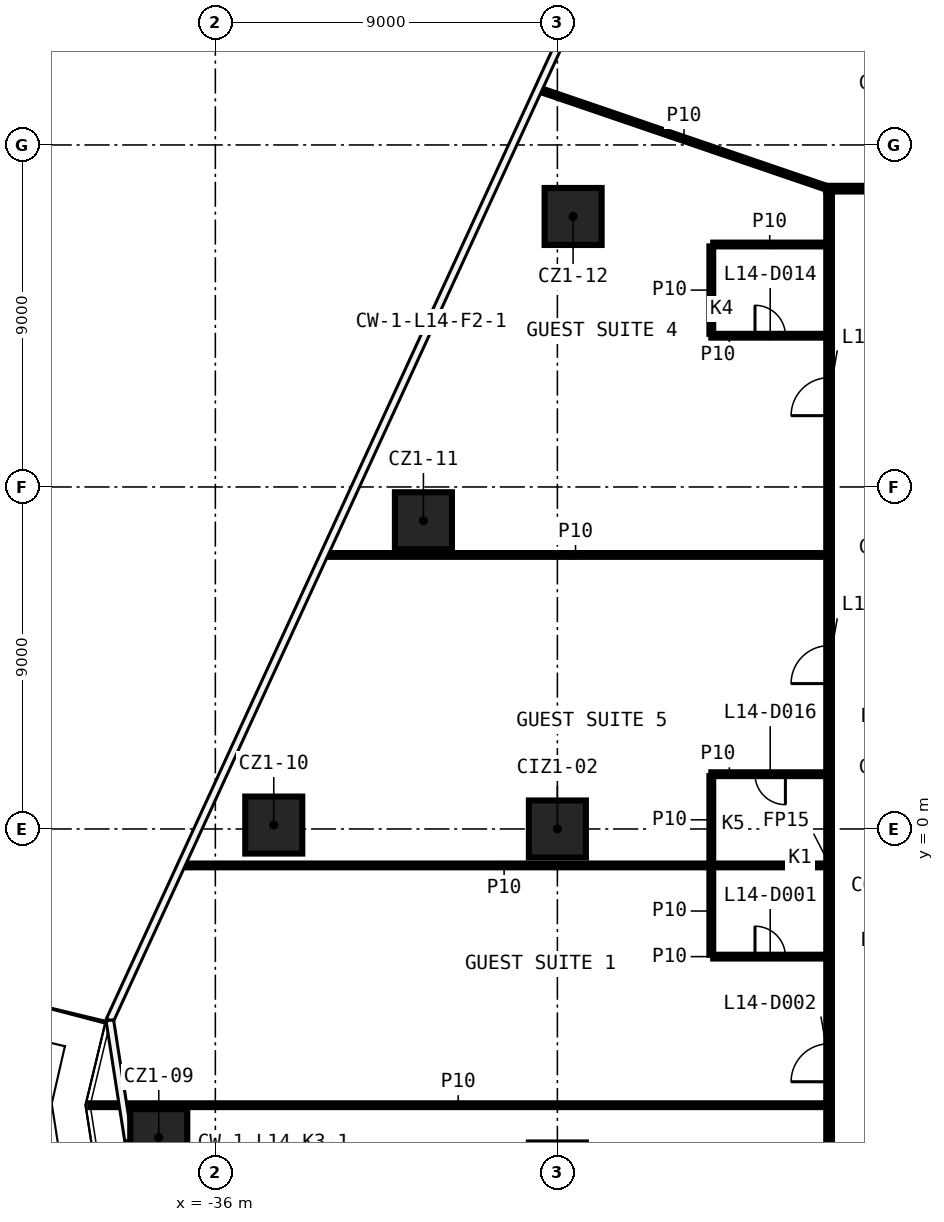
"""IFC4 building model, lengths in metres.
Left out: names, types, materials, properties, quantities, classifications, styles, units other than length and angle.
Written with IfcOpenShell. Run it as: python <this file> out.ifc"""

import sys

from ifc_helpers import new_model, si_unit, direction, frame, frame_2d, origin, origin_2d, place, context, subcontext, project, spatial, rectangle, extrude, element, fill, save


model = new_model("IFC4")
c1 = context("Model", 3, precision=1e-05, world=origin(), true_north=direction((0.0, 1.0)))
c2 = subcontext(c1, "Body", "Model", "MODEL_VIEW")
j1 = project(units=[si_unit("LENGTHUNIT", "METRE"), si_unit("PLANEANGLEUNIT", "RADIAN")], contexts=[c1])
p1 = place(None, origin())
s1 = spatial("IfcSite", under=j1, at=p1, CompositionType="ELEMENT")
p2 = place(p1, origin())
s2 = spatial("IfcBuilding", under=s1, at=p2, CompositionType="ELEMENT")
p3 = place(p2, frame((0.0, 0.0, 73.6)))
s3 = spatial("IfcBuildingStorey", under=s2, at=p3, CompositionType="ELEMENT", Elevation=73.6)
for number, where, z_axis, x_axis in (
    (1, (-37.489, -8.123, 0.0), (0.0, 0.0, 1.0), (1.0, 0.0, 0.0)),
    (2, (-34.463, 0.103, 0.0), (0.0, 0.0, 1.0), (1.0, 0.0, 0.0)),
    (3, (-30.525, 8.111, 0.0), (0.0, 0.0, 1.0), (1.0, 0.0, 0.0)),
    (4, (-26.586, 16.118, 0.0), (0.0, 0.0, 1.0), (1.0, 0.0, 0.0)),
    (5, (-27.0, 0.0, 0.0), (0.0, 0.0, 1.0), (1.0, 0.0, 0.0)),
):
    element("IfcColumn", number, at=place(p3, frame(where, z_axis=z_axis, x_axis=x_axis)), inside=s3, PredefinedType="COLUMN", context=c2, shape_type="SweptSolid", body=[
        extrude(rectangle(XDim=1.5, YDim=1.5, at=origin_2d()), origin(), (0.0, 0.0, 1.0), 3.3),
    ])
p4 = place(p3, frame((-39.293, -7.269, 0.0), z_axis=(0.0, 0.0, 1.0), x_axis=(1.0, 0.0, 0.0)))
e6 = element("IfcWall", 6, at=p4, inside=s3, PredefinedType="PARTITIONING", context=c2, shape_type="SweptSolid", body=[
    extrude(rectangle(XDim=19.368, YDim=0.1, at=frame_2d((9.684, 0.0))), origin(), (0.0, 0.0, 1.0), 3.3),
])
p5 = place(p3, frame((-22.9, -3.359, 0.0), z_axis=(0.0, 0.0, 1.0), x_axis=(1.0, 0.0, 0.0)))
e7 = element("IfcWall", 7, at=p5, inside=s3, PredefinedType="PARTITIONING", context=c2, shape_type="SweptSolid", body=[
    extrude(rectangle(XDim=2.975, YDim=0.1, at=frame_2d((1.487, 0.0))), origin(), (0.0, 0.0, 1.0), 3.3),
])
p6 = place(p5, frame((1.1, 0.0, 0.0)))
e8 = element("IfcOpeningElement", 8, at=p6, cuts=e7, PredefinedType="OPENING", context=c2, shape_type="SweptSolid", body=[
    extrude(rectangle(XDim=0.8, YDim=2.1, at=frame_2d((0.4, 1.05))), frame((0.0, 0.06, 0.0), z_axis=(0.0, -1.0, 0.0), x_axis=(1.0, 0.0, 0.0)), (0.0, 0.0, 1.0), 0.12),
])
p7 = place(p3, frame((-36.879, -0.959, 0.0), z_axis=(0.0, 0.0, 1.0), x_axis=(1.0, 0.0, 0.0)))
e9 = element("IfcWall", 9, at=p7, inside=s3, PredefinedType="PARTITIONING", context=c2, shape_type="SweptSolid", body=[
    extrude(rectangle(XDim=16.954, YDim=0.1, at=frame_2d((8.477, 0.0))), origin(), (0.0, 0.0, 1.0), 3.3),
])
p8 = place(p3, frame((-19.925, 1.441, 0.0), z_axis=(0.0, 0.0, 1.0), x_axis=(-1.0, 0.0, 0.0)))
e10 = element("IfcWall", 10, at=p8, inside=s3, PredefinedType="PARTITIONING", context=c2, shape_type="SweptSolid", body=[
    extrude(rectangle(XDim=3.025, YDim=0.1, at=frame_2d((1.512, 0.0))), origin(), (0.0, 0.0, 1.0), 3.3),
])
p9 = place(p8, frame((1.075, 0.0, 0.0)))
e11 = element("IfcOpeningElement", 11, at=p9, cuts=e10, PredefinedType="OPENING", context=c2, shape_type="SweptSolid", body=[
    extrude(rectangle(XDim=0.8, YDim=2.1, at=frame_2d((0.4, 1.05))), frame((0.0, 0.06, 0.0), z_axis=(0.0, -1.0, 0.0), x_axis=(1.0, 0.0, 0.0)), (0.0, 0.0, 1.0), 0.12),
])
p10 = place(p3, frame((-33.12, 7.211, 0.0), z_axis=(0.0, 0.0, 1.0), x_axis=(1.0, 0.0, 0.0)))
e12 = element("IfcWall", 12, at=p10, inside=s3, PredefinedType="PARTITIONING", context=c2, shape_type="SweptSolid", body=[
    extrude(rectangle(XDim=13.195, YDim=0.1, at=frame_2d((6.597, 0.0))), origin(), (0.0, 0.0, 1.0), 3.3),
])
p11 = place(p3, frame((-22.95, 12.98, 0.0), z_axis=(0.0, 0.0, 1.0), x_axis=(1.0, 0.0, 0.0)))
e13 = element("IfcWall", 13, at=p11, inside=s3, PredefinedType="PARTITIONING", context=c2, shape_type="SweptSolid", body=[
    extrude(rectangle(XDim=3.025, YDim=0.1, at=frame_2d((1.512, 0.0))), origin(), (0.0, 0.0, 1.0), 3.3),
])
p12 = place(p11, frame((1.15, 0.0, 0.0)))
e14 = element("IfcOpeningElement", 14, at=p12, cuts=e13, PredefinedType="OPENING", context=c2, shape_type="SweptSolid", body=[
    extrude(rectangle(XDim=0.8, YDim=2.1, at=frame_2d((0.4, 1.05))), frame((0.0, 0.06, 0.0), z_axis=(0.0, -1.0, 0.0), x_axis=(1.0, 0.0, 0.0)), (0.0, 0.0, 1.0), 0.12),
])
p13 = place(p3, frame((-22.9, 15.38, 0.0), z_axis=(0.0, 0.0, 1.0), x_axis=(1.0, 0.0, 0.0)))
e15 = element("IfcWall", 15, at=p13, inside=s3, PredefinedType="PARTITIONING", context=c2, shape_type="SweptSolid", body=[
    extrude(rectangle(XDim=2.975, YDim=0.1, at=frame_2d((1.487, 0.0))), origin(), (0.0, 0.0, 1.0), 3.3),
])
p14 = place(p3, frame((-19.925, 16.85, 0.0), z_axis=(0.0, 0.0, 1.0), x_axis=(1.0, 0.0, 0.0)))
e16 = element("IfcWall", 16, at=p14, inside=s3, PredefinedType="PARTITIONING", context=c2, shape_type="SweptSolid", body=[
    extrude(rectangle(XDim=39.85, YDim=0.15, at=frame_2d((19.925, 0.0))), origin(), (0.0, 0.0, 1.0), 3.3),
])
p15 = place(p14, frame((31.436, 0.0, 0.0)))
e17 = element("IfcOpeningElement", 17, at=p15, cuts=e16, PredefinedType="OPENING", context=c2, shape_type="SweptSolid", body=[
    extrude(rectangle(XDim=0.9, YDim=2.1, at=frame_2d((0.45, 1.05))), frame((0.0, 0.085, 0.0), z_axis=(0.0, -1.0, 0.0), x_axis=(1.0, 0.0, 0.0)), (0.0, 0.0, 1.0), 0.17),
])
p16 = place(p14, frame((16.954, 0.0, 0.0)))
e18 = element("IfcOpeningElement", 18, at=p16, cuts=e16, PredefinedType="OPENING", context=c2, shape_type="SweptSolid", body=[
    extrude(rectangle(XDim=0.9, YDim=2.1, at=frame_2d((0.45, 1.05))), frame((0.0, 0.085, 0.0), z_axis=(0.0, -1.0, 0.0), x_axis=(1.0, 0.0, 0.0)), (0.0, 0.0, 1.0), 0.17),
])
p17 = place(p14, frame((7.208, 0.0, 0.0)))
e19 = element("IfcOpeningElement", 19, at=p17, cuts=e16, PredefinedType="OPENING", context=c2, shape_type="SweptSolid", body=[
    extrude(rectangle(XDim=0.9, YDim=2.1, at=frame_2d((0.45, 1.05))), frame((0.0, 0.085, 0.0), z_axis=(0.0, -1.0, 0.0), x_axis=(1.0, 0.0, 0.0)), (0.0, 0.0, 1.0), 0.17),
])
p18 = place(p3, frame((-19.85, -16.775, 0.0), z_axis=(0.0, 0.0, 1.0), x_axis=(0.0, 1.0, 0.0)))
e20 = element("IfcWall", 20, at=p18, inside=s3, PredefinedType="PARTITIONING", context=c2, shape_type="SweptSolid", body=[
    extrude(rectangle(XDim=33.55, YDim=0.15, at=frame_2d((16.775, 0.0))), origin(), (0.0, 0.0, 1.0), 3.3),
])
p19 = place(p18, frame((10.123, 0.0, 0.0)))
e21 = element("IfcOpeningElement", 21, at=p19, cuts=e20, PredefinedType="OPENING", context=c2, shape_type="SweptSolid", body=[
    extrude(rectangle(XDim=1.0, YDim=2.1, at=frame_2d((0.5, 1.05))), frame((0.0, 0.085, 0.0), z_axis=(0.0, -1.0, 0.0), x_axis=(1.0, 0.0, 0.0)), (0.0, 0.0, 1.0), 0.17),
])
p20 = place(p18, frame((4.179, 0.0, 0.0)))
e22 = element("IfcOpeningElement", 22, at=p20, cuts=e20, PredefinedType="OPENING", context=c2, shape_type="SweptSolid", body=[
    extrude(rectangle(XDim=0.9, YDim=2.1, at=frame_2d((0.45, 1.05))), frame((0.0, 0.085, 0.0), z_axis=(0.0, -1.0, 0.0), x_axis=(1.0, 0.0, 0.0)), (0.0, 0.0, 1.0), 0.17),
])
p21 = place(p18, frame((27.651, 0.0, 0.0)))
e23 = element("IfcOpeningElement", 23, at=p21, cuts=e20, PredefinedType="OPENING", context=c2, shape_type="SweptSolid", body=[
    extrude(rectangle(XDim=1.0, YDim=2.1, at=frame_2d((0.5, 1.05))), frame((0.0, 0.085, 0.0), z_axis=(0.0, -1.0, 0.0), x_axis=(1.0, 0.0, 0.0)), (0.0, 0.0, 1.0), 0.17),
])
p22 = place(p18, frame((20.601, 0.0, 0.0)))
e24 = element("IfcOpeningElement", 24, at=p22, cuts=e20, PredefinedType="OPENING", context=c2, shape_type="SweptSolid", body=[
    extrude(rectangle(XDim=1.0, YDim=2.1, at=frame_2d((0.5, 1.05))), frame((0.0, 0.085, 0.0), z_axis=(0.0, -1.0, 0.0), x_axis=(1.0, 0.0, 0.0)), (0.0, 0.0, 1.0), 0.17),
])
p23 = place(p3, frame((-22.95, -3.309, 0.0), z_axis=(0.0, 0.0, 1.0), x_axis=(0.0, 1.0, 0.0)))
e25 = element("IfcWall", 25, at=p23, inside=s3, PredefinedType="PARTITIONING", context=c2, shape_type="SweptSolid", body=[
    extrude(rectangle(XDim=2.3, YDim=0.1, at=frame_2d((1.15, 0.0))), origin(), (0.0, 0.0, 1.0), 3.3),
])
for number, where, z_axis, x_axis in (
    (26, (-22.95, -0.909, 0.0), (0.0, 0.0, 1.0), (0.0, 1.0, 0.0)),
    (27, (-22.95, 13.03, 0.0), (0.0, 0.0, 1.0), (0.0, 1.0, 0.0)),
):
    element("IfcWall", number, at=place(p3, frame(where, z_axis=z_axis, x_axis=x_axis)), inside=s3, PredefinedType="PARTITIONING", context=c2, shape_type="SweptSolid", body=[
        extrude(rectangle(XDim=2.3, YDim=0.1, at=frame_2d((1.15, 0.0))), origin(), (0.0, 0.0, 1.0), 3.3),
    ])
p24 = place(p3, frame((-27.484, 19.458, 0.0), z_axis=(0.0, 0.0, 1.0), x_axis=(0.946262238114, -0.323400335065, 0.0)))
e28 = element("IfcWall", 28, at=p24, inside=s3, PredefinedType="PARTITIONING", context=c2, shape_type="SweptSolid", body=[
    extrude(rectangle(XDim=8.067, YDim=0.1, at=frame_2d((4.034, 0.0))), origin(), (0.0, 0.0, 1.0), 3.3),
])
p25 = place(p6, origin())
e29 = element("IfcDoor", 29, at=p25, inside=s3, OperationType="SINGLE_SWING_LEFT", PredefinedType="DOOR", context=c2, shape_type="SweptSolid", body=[
    extrude(rectangle(XDim=0.8, YDim=2.1, at=frame_2d((0.4, 1.05))), frame((0.0, 0.025, 0.0), z_axis=(0.0, -1.0, 0.0), x_axis=(1.0, 0.0, 0.0)), (0.0, 0.0, 1.0), 0.05),
])
fill(e8, e29)
p26 = place(p19, origin())
e30 = element("IfcDoor", 30, at=p26, inside=s3, OperationType="SINGLE_SWING_RIGHT", PredefinedType="DOOR", context=c2, shape_type="SweptSolid", body=[
    extrude(rectangle(XDim=1.0, YDim=2.1, at=frame_2d((0.5, 1.05))), frame((0.0, 0.025, 0.0), z_axis=(0.0, -1.0, 0.0), x_axis=(1.0, 0.0, 0.0)), (0.0, 0.0, 1.0), 0.05),
])
fill(e21, e30)
p27 = place(p12, origin())
e31 = element("IfcDoor", 31, at=p27, inside=s3, OperationType="SINGLE_SWING_LEFT", PredefinedType="DOOR", context=c2, shape_type="SweptSolid", body=[
    extrude(rectangle(XDim=0.8, YDim=2.1, at=frame_2d((0.4, 1.05))), frame((0.0, 0.025, 0.0), z_axis=(0.0, -1.0, 0.0), x_axis=(1.0, 0.0, 0.0)), (0.0, 0.0, 1.0), 0.05),
])
fill(e14, e31)
p28 = place(p21, origin())
e32 = element("IfcDoor", 32, at=p28, inside=s3, OperationType="SINGLE_SWING_RIGHT", PredefinedType="DOOR", context=c2, shape_type="SweptSolid", body=[
    extrude(rectangle(XDim=1.0, YDim=2.1, at=frame_2d((0.5, 1.05))), frame((0.0, 0.025, 0.0), z_axis=(0.0, -1.0, 0.0), x_axis=(1.0, 0.0, 0.0)), (0.0, 0.0, 1.0), 0.05),
])
fill(e23, e32)
p29 = place(p9, origin())
e33 = element("IfcDoor", 33, at=p29, inside=s3, OperationType="SINGLE_SWING_RIGHT", PredefinedType="DOOR", context=c2, shape_type="SweptSolid", body=[
    extrude(rectangle(XDim=0.8, YDim=2.1, at=frame_2d((0.4, 1.05))), frame((0.0, 0.025, 0.0), z_axis=(0.0, -1.0, 0.0), x_axis=(1.0, 0.0, 0.0)), (0.0, 0.0, 1.0), 0.05),
])
fill(e11, e33)
p30 = place(p22, origin())
e34 = element("IfcDoor", 34, at=p30, inside=s3, OperationType="SINGLE_SWING_LEFT", PredefinedType="DOOR", context=c2, shape_type="SweptSolid", body=[
    extrude(rectangle(XDim=1.0, YDim=2.1, at=frame_2d((0.5, 1.05))), frame((0.0, 0.025, 0.0), z_axis=(0.0, -1.0, 0.0), x_axis=(1.0, 0.0, 0.0)), (0.0, 0.0, 1.0), 0.05),
])
fill(e24, e34)
save(model, sys.argv[1])
